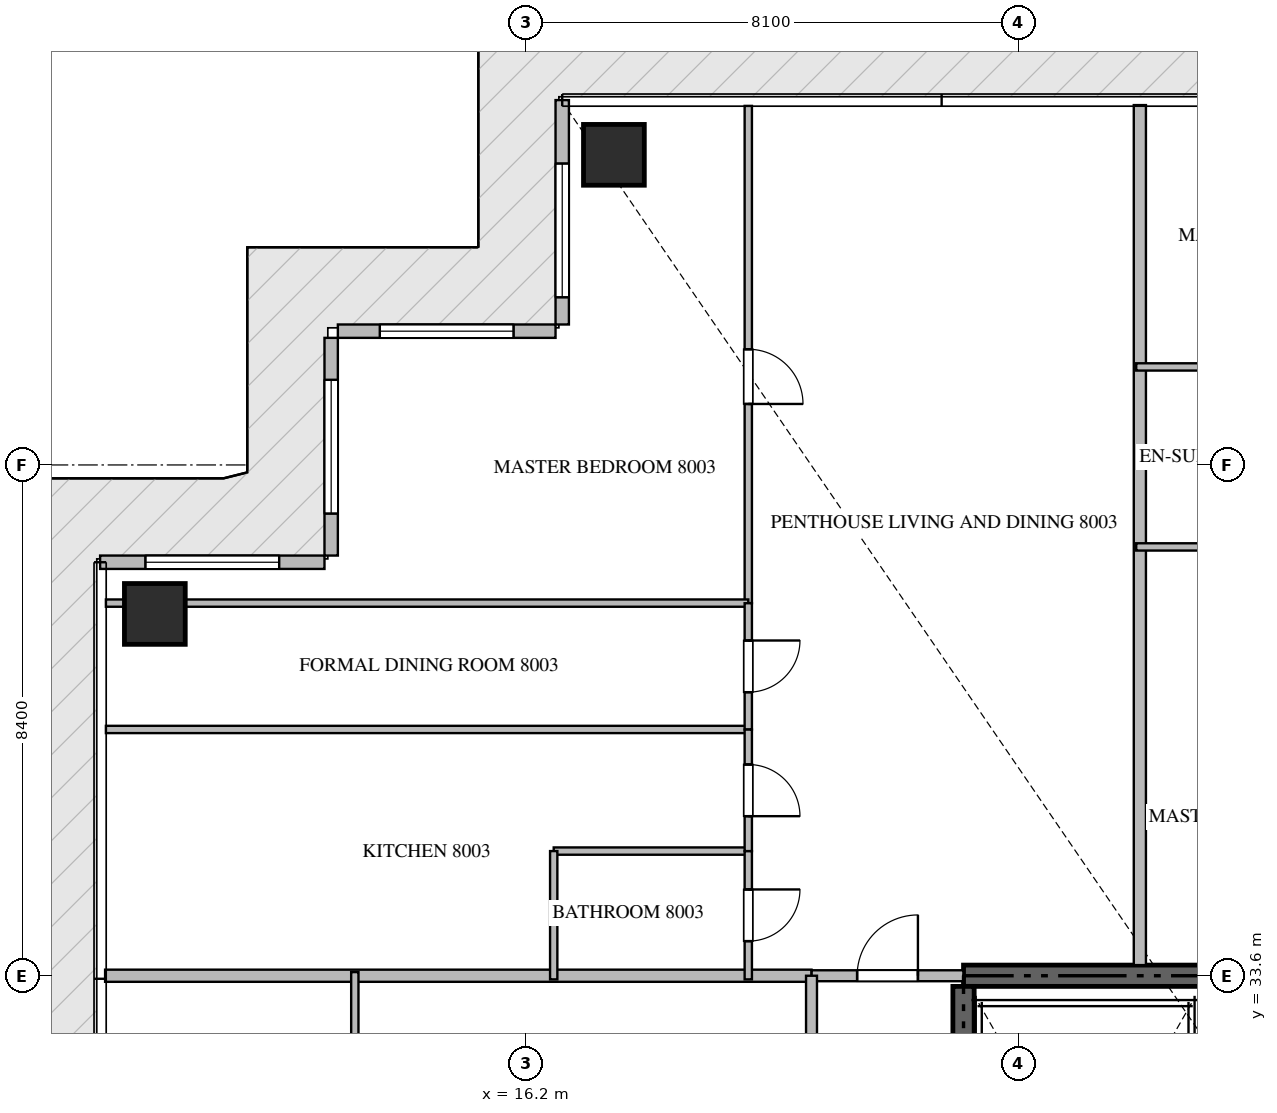
"""IFC4 building model, lengths in metres.
Left out: names, types, materials, properties, quantities, classifications, styles, units other than length and angle.
Written with IfcOpenShell. Run it as: python <this file> out.ifc"""

import sys

from ifc_helpers import new_model, si_unit, direction, frame, frame_2d, origin, origin_2d, place, context, subcontext, project, spatial, rectangle, extrude, source, transform, mapped, element, fill, save


model = new_model("IFC4")
c1 = context("Model", 3, precision=1e-05, world=origin(), true_north=direction((0.0, 1.0)))
c2 = subcontext(c1, "Body", "Model", "MODEL_VIEW")
j1 = project(units=[si_unit("LENGTHUNIT", "METRE"), si_unit("PLANEANGLEUNIT", "RADIAN")], contexts=[c1])
p1 = place(None, origin())
s1 = spatial("IfcSite", under=j1, at=p1, CompositionType="ELEMENT")
p2 = place(p1, origin())
s2 = spatial("IfcBuilding", under=s1, at=p2, CompositionType="ELEMENT")
p3 = place(p2, frame((0.0, 0.0, 321.8)))
s3 = spatial("IfcBuildingStorey", under=s2, at=p3, CompositionType="ELEMENT", Elevation=321.8)
p4 = place(p3, frame((41.4, 33.6, -0.26), z_axis=(0.0, 0.0, 1.0), x_axis=(-1.0, 0.0, 0.0)))
e1 = element("IfcWall", 1, at=p4, inside=s3, PredefinedType="SHEAR", context=c2, shape_type="SweptSolid", body=[
    extrude(rectangle(XDim=18.0, YDim=0.35, at=frame_2d((9.0, 0.0))), origin(), (0.0, 0.0, 1.0), 4.048),
])
p5 = place(p3, frame((23.4, 24.25, -0.26), z_axis=(0.0, 0.0, 1.0), x_axis=(0.0, 1.0, 0.0)))
e2 = element("IfcWall", 2, at=p5, inside=s3, PredefinedType="SHEAR", context=c2, shape_type="SweptSolid", body=[
    extrude(rectangle(XDim=9.175, YDim=0.35, at=frame_2d((4.587, 0.0))), origin(), (0.0, 0.0, 1.0), 4.048),
])
m1 = source(origin(), c2, "Body", "SweptSolid", [
    extrude(rectangle(XDim=1.0, YDim=1.0, at=origin_2d()), origin(), (0.0, 0.0, 1.0), 4.05),
])
for number, where, z_axis, x_axis in (
    (3, (17.65, 47.1, -0.26), (0.0, 0.0, 1.0), (1.0, 0.0, 0.0)),
    (4, (10.1, 39.55, -0.26), (0.0, 0.0, 1.0), (1.0, 0.0, 0.0)),
):
    element("IfcColumn", number, at=place(p3, frame(where, z_axis=z_axis, x_axis=x_axis)), inside=s3, PredefinedType="COLUMN", context=c2, shape_type="MappedRepresentation", body=[
        mapped(m1, transform((0.0, 0.0, 0.0), scale=1.0)),
    ])
p6 = place(p3, frame((16.8, 48.0, 0.0), z_axis=(0.0, 0.0, 1.0), x_axis=(0.0, -1.0, 0.0)))
e5 = element("IfcWall", 5, at=p6, inside=s3, PredefinedType="ELEMENTEDWALL", context=c2, shape_type="SweptSolid", body=[
    extrude(rectangle(XDim=3.69, YDim=0.22, at=frame_2d((1.845, 0.0))), origin(), (0.0, 0.0, 1.0), 3.775),
])
p7 = place(p6, frame((1.043, 0.0, 0.65)))
e6 = element("IfcOpeningElement", 6, at=p7, cuts=e5, PredefinedType="OPENING", context=c2, shape_type="SweptSolid", body=[
    extrude(rectangle(XDim=2.2, YDim=2.4, at=frame_2d((1.1, 1.2))), frame((0.0, 0.12, 0.0), z_axis=(0.0, -1.0, 0.0), x_axis=(1.0, 0.0, 0.0)), (0.0, 0.0, 1.0), 0.24),
])
p8 = place(p3, frame((16.69, 44.2, 0.0), z_axis=(0.0, 0.0, 1.0), x_axis=(-1.0, 0.0, 0.0)))
e7 = element("IfcWall", 7, at=p8, inside=s3, PredefinedType="ELEMENTEDWALL", context=c2, shape_type="SweptSolid", body=[
    extrude(rectangle(XDim=3.58, YDim=0.22, at=frame_2d((1.79, 0.0))), origin(), (0.0, 0.0, 1.0), 3.775),
])
p9 = place(p8, frame((0.69, 0.0, 0.65)))
e8 = element("IfcOpeningElement", 8, at=p9, cuts=e7, PredefinedType="OPENING", context=c2, shape_type="SweptSolid", body=[
    extrude(rectangle(XDim=2.2, YDim=2.4, at=frame_2d((1.1, 1.2))), frame((0.0, 0.12, 0.0), z_axis=(0.0, -1.0, 0.0), x_axis=(1.0, 0.0, 0.0)), (0.0, 0.0, 1.0), 0.24),
])
p10 = place(p3, frame((13.0, 44.09, 0.0), z_axis=(0.0, 0.0, 1.0), x_axis=(0.0, -1.0, 0.0)))
e9 = element("IfcWall", 9, at=p10, inside=s3, PredefinedType="ELEMENTEDWALL", context=c2, shape_type="SweptSolid", body=[
    extrude(rectangle(XDim=3.58, YDim=0.22, at=frame_2d((1.79, 0.0))), origin(), (0.0, 0.0, 1.0), 3.775),
])
p11 = place(p10, frame((0.69, 0.0, 0.65)))
e10 = element("IfcOpeningElement", 10, at=p11, cuts=e9, PredefinedType="OPENING", context=c2, shape_type="SweptSolid", body=[
    extrude(rectangle(XDim=2.2, YDim=2.4, at=frame_2d((1.1, 1.2))), frame((0.0, 0.12, 0.0), z_axis=(0.0, -1.0, 0.0), x_axis=(1.0, 0.0, 0.0)), (0.0, 0.0, 1.0), 0.24),
])
p12 = place(p3, frame((12.89, 40.4, 0.0), z_axis=(0.0, 0.0, 1.0), x_axis=(-1.0, 0.0, 0.0)))
e11 = element("IfcWall", 11, at=p12, inside=s3, PredefinedType="ELEMENTEDWALL", context=c2, shape_type="SweptSolid", body=[
    extrude(rectangle(XDim=3.69, YDim=0.22, at=frame_2d((1.845, 0.0))), origin(), (0.0, 0.0, 1.0), 3.775),
])
p13 = place(p12, frame((0.745, 0.0, 0.65)))
e12 = element("IfcOpeningElement", 12, at=p13, cuts=e11, PredefinedType="OPENING", context=c2, shape_type="SweptSolid", body=[
    extrude(rectangle(XDim=2.2, YDim=2.4, at=frame_2d((1.1, 1.2))), frame((0.0, 0.12, 0.0), z_axis=(0.0, -1.0, 0.0), x_axis=(1.0, 0.0, 0.0)), (0.0, 0.0, 1.0), 0.24),
])
p14 = place(p3, frame((26.3, 33.775, 0.0), z_axis=(0.0, 0.0, 1.0), x_axis=(0.0, 1.0, 0.0)))
e13 = element("IfcWall", 13, at=p14, inside=s3, PredefinedType="PARTITIONING", context=c2, shape_type="SweptSolid", body=[
    extrude(rectangle(XDim=14.143, YDim=0.2, at=frame_2d((7.072, 0.0))), origin(), (0.0, 0.0, 1.0), 3.79),
])
p15 = place(p3, frame((9.282, 33.6, 0.0), z_axis=(0.0, 0.0, 1.0), x_axis=(1.0, 0.0, 0.0)))
e14 = element("IfcWall", 14, at=p15, inside=s3, PredefinedType="PARTITIONING", context=c2, shape_type="SweptSolid", body=[
    extrude(rectangle(XDim=11.618, YDim=0.2, at=frame_2d((5.809, 0.0))), origin(), (0.0, 0.0, 1.0), 3.79),
])
p16 = place(p3, frame((20.902, 33.6, 0.0), z_axis=(0.0, 0.0, 1.0), x_axis=(1.0, 0.0, 0.0)))
e15 = element("IfcWall", 15, at=p16, inside=s3, PredefinedType="PARTITIONING", context=c2, shape_type="SweptSolid", body=[
    extrude(rectangle(XDim=2.496, YDim=0.18, at=frame_2d((1.248, 0.0))), origin(), (0.0, 0.0, 1.0), 3.79),
])
p17 = place(p16, frame((0.748, 0.0, 0.0)))
e16 = element("IfcOpeningElement", 16, at=p17, cuts=e15, PredefinedType="OPENING", context=c2, shape_type="SweptSolid", body=[
    extrude(rectangle(XDim=1.0, YDim=2.15, at=frame_2d((0.5, 1.075))), frame((0.0, 0.1, 0.0), z_axis=(0.0, -1.0, 0.0), x_axis=(1.0, 0.0, 0.0)), (0.0, 0.0, 1.0), 0.2),
])
p18 = place(p3, frame((20.9, 16.8, 0.0), z_axis=(0.0, 0.0, 1.0), x_axis=(0.0, 1.0, 0.0)))
e17 = element("IfcWall", 17, at=p18, inside=s3, PredefinedType="PARTITIONING", context=c2, shape_type="SweptSolid", body=[
    extrude(rectangle(XDim=16.8, YDim=0.18, at=frame_2d((8.4, 0.0))), origin(), (0.0, 0.0, 1.0), 3.79),
])
p19 = place(p18, frame((1.3, 0.0, 0.0)))
e18 = element("IfcOpeningElement", 18, at=p19, cuts=e17, PredefinedType="OPENING", context=c2, shape_type="SweptSolid", body=[
    extrude(rectangle(XDim=1.0, YDim=2.15, at=frame_2d((0.5, 1.075))), frame((0.0, 0.1, 0.0), z_axis=(0.0, -1.0, 0.0), x_axis=(1.0, 0.0, 0.0)), (0.0, 0.0, 1.0), 0.2),
])
p20 = place(p3, frame((19.86, 47.905, 0.0), z_axis=(0.0, 0.0, 1.0), x_axis=(0.0, -1.0, 0.0)))
e19 = element("IfcWall", 19, at=p20, inside=s3, PredefinedType="PARTITIONING", context=c2, shape_type="SweptSolid", body=[
    extrude(rectangle(XDim=8.177, YDim=0.12, at=frame_2d((4.088, 0.0))), origin(), (0.0, 0.0, 1.0), 3.79),
])
p21 = place(p20, frame((4.002, 0.0, 0.0)))
e20 = element("IfcOpeningElement", 20, at=p21, cuts=e19, PredefinedType="OPENING", context=c2, shape_type="SweptSolid", body=[
    extrude(rectangle(XDim=0.9, YDim=2.1, at=frame_2d((0.45, 1.05))), frame((0.0, 0.07, 0.0), z_axis=(0.0, -1.0, 0.0), x_axis=(1.0, 0.0, 0.0)), (0.0, 0.0, 1.0), 0.14),
])
p22 = place(p3, frame((9.295, 39.728, 0.0), z_axis=(0.0, 0.0, 1.0), x_axis=(1.0, 0.0, 0.0)))
e21 = element("IfcWall", 21, at=p22, inside=s3, PredefinedType="PARTITIONING", context=c2, shape_type="SweptSolid", body=[
    extrude(rectangle(XDim=10.565, YDim=0.12, at=frame_2d((5.283, 0.0))), origin(), (0.0, 0.0, 1.0), 3.292),
])
p23 = place(p3, frame((9.295, 37.65, 0.0), z_axis=(0.0, 0.0, 1.0), x_axis=(1.0, 0.0, 0.0)))
e22 = element("IfcWall", 22, at=p23, inside=s3, PredefinedType="PARTITIONING", context=c2, shape_type="SweptSolid", body=[
    extrude(rectangle(XDim=10.565, YDim=0.12, at=frame_2d((5.283, 0.0))), origin(), (0.0, 0.0, 1.0), 3.79),
])
p24 = place(p3, frame((16.66, 35.65, 0.0), z_axis=(0.0, 0.0, 1.0), x_axis=(1.0, 0.0, 0.0)))
e23 = element("IfcWall", 23, at=p24, inside=s3, PredefinedType="PARTITIONING", context=c2, shape_type="SweptSolid", body=[
    extrude(rectangle(XDim=3.2, YDim=0.12, at=frame_2d((1.6, 0.0))), origin(), (0.0, 0.0, 1.0), 3.79),
])
p25 = place(p3, frame((16.66, 35.65, 0.0), z_axis=(0.0, 0.0, 1.0), x_axis=(0.0, -1.0, 0.0)))
e24 = element("IfcWall", 24, at=p25, inside=s3, PredefinedType="PARTITIONING", context=c2, shape_type="SweptSolid", body=[
    extrude(rectangle(XDim=2.11, YDim=0.12, at=frame_2d((1.055, 0.0))), origin(), (0.0, 0.0, 1.0), 3.79),
])
p26 = place(p3, frame((19.86, 39.726, 0.0), z_axis=(0.0, 0.0, 1.0), x_axis=(0.0, -1.0, 0.0)))
e25 = element("IfcWall", 25, at=p26, inside=s3, PredefinedType="PARTITIONING", context=c2, shape_type="SweptSolid", body=[
    extrude(rectangle(XDim=2.076, YDim=0.12, at=frame_2d((1.038, 0.0))), origin(), (0.0, 0.0, 1.0), 3.79),
])
p27 = place(p26, frame((0.613, 0.0, 0.0)))
e26 = element("IfcOpeningElement", 26, at=p27, cuts=e25, PredefinedType="OPENING", context=c2, shape_type="SweptSolid", body=[
    extrude(rectangle(XDim=0.85, YDim=2.1, at=frame_2d((0.425, 1.05))), frame((0.0, 0.07, 0.0), z_axis=(0.0, -1.0, 0.0), x_axis=(1.0, 0.0, 0.0)), (0.0, 0.0, 1.0), 0.14),
])
p28 = place(p3, frame((19.86, 37.648, 0.0), z_axis=(0.0, 0.0, 1.0), x_axis=(0.0, -1.0, 0.0)))
e27 = element("IfcWall", 27, at=p28, inside=s3, PredefinedType="PARTITIONING", context=c2, shape_type="SweptSolid", body=[
    extrude(rectangle(XDim=1.998, YDim=0.12, at=frame_2d((0.999, 0.0))), origin(), (0.0, 0.0, 1.0), 3.79),
])
p29 = place(p28, frame((0.574, 0.0, 0.0)))
e28 = element("IfcOpeningElement", 28, at=p29, cuts=e27, PredefinedType="OPENING", context=c2, shape_type="SweptSolid", body=[
    extrude(rectangle(XDim=0.85, YDim=2.1, at=frame_2d((0.425, 1.05))), frame((0.0, 0.07, 0.0), z_axis=(0.0, -1.0, 0.0), x_axis=(1.0, 0.0, 0.0)), (0.0, 0.0, 1.0), 0.14),
])
p30 = place(p3, frame((19.86, 35.648, 0.0), z_axis=(0.0, 0.0, 1.0), x_axis=(0.0, -1.0, 0.0)))
e29 = element("IfcWall", 29, at=p30, inside=s3, PredefinedType="PARTITIONING", context=c2, shape_type="SweptSolid", body=[
    extrude(rectangle(XDim=2.108, YDim=0.12, at=frame_2d((1.054, 0.0))), origin(), (0.0, 0.0, 1.0), 3.79),
])
p31 = place(p30, frame((0.629, 0.0, 0.0)))
e30 = element("IfcOpeningElement", 30, at=p31, cuts=e29, PredefinedType="OPENING", context=c2, shape_type="SweptSolid", body=[
    extrude(rectangle(XDim=0.85, YDim=2.1, at=frame_2d((0.425, 1.05))), frame((0.0, 0.07, 0.0), z_axis=(0.0, -1.0, 0.0), x_axis=(1.0, 0.0, 0.0)), (0.0, 0.0, 1.0), 0.14),
])
for number, where, z_axis, x_axis in (
    (31, (26.24, 43.612, 0.0), (0.0, 0.0, 1.0), (1.0, 0.0, 0.0)),
    (32, (26.24, 40.652, 0.0), (0.0, 0.0, 1.0), (1.0, 0.0, 0.0)),
):
    element("IfcWall", number, at=place(p3, frame(where, z_axis=z_axis, x_axis=x_axis)), inside=s3, PredefinedType="PARTITIONING", context=c2, shape_type="SweptSolid", body=[
        extrude(rectangle(XDim=4.79, YDim=0.12, at=frame_2d((2.395, 0.0))), origin(), (0.0, 0.0, 1.0), 3.79),
    ])
p32 = place(p3, frame((13.389, 23.18, 0.0), z_axis=(0.0, 0.0, 1.0), x_axis=(0.0, 1.0, 0.0)))
e33 = element("IfcWall", 33, at=p32, inside=s3, PredefinedType="PARTITIONING", context=c2, shape_type="SweptSolid", body=[
    extrude(rectangle(XDim=10.48, YDim=0.12, at=frame_2d((5.24, 0.0))), origin(), (0.0, 0.0, 1.0), 3.79),
])
m2 = source(origin(), c2, "Body", "SweptSolid", [
    extrude(rectangle(XDim=2.2, YDim=2.4, at=frame_2d((1.1, 1.2))), frame((0.0, 0.03, 0.0), z_axis=(0.0, -1.0, 0.0), x_axis=(1.0, 0.0, 0.0)), (0.0, 0.0, 1.0), 0.06),
])
p33 = place(p7, origin())
e34 = element("IfcWindow", 34, at=p33, inside=s3, PartitioningType="SINGLE_PANEL", PredefinedType="WINDOW", context=c2, shape_type="MappedRepresentation", body=[
    mapped(m2, transform((0.0, 0.0, 0.0), scale=1.0)),
])
fill(e6, e34)
p34 = place(p9, origin())
e35 = element("IfcWindow", 35, at=p34, inside=s3, PartitioningType="SINGLE_PANEL", PredefinedType="WINDOW", context=c2, shape_type="MappedRepresentation", body=[
    mapped(m2, transform((0.0, 0.0, 0.0), scale=1.0)),
])
fill(e8, e35)
p35 = place(p11, origin())
e36 = element("IfcWindow", 36, at=p35, inside=s3, PartitioningType="SINGLE_PANEL", PredefinedType="WINDOW", context=c2, shape_type="MappedRepresentation", body=[
    mapped(m2, transform((0.0, 0.0, 0.0), scale=1.0)),
])
fill(e10, e36)
p36 = place(p13, origin())
e37 = element("IfcWindow", 37, at=p36, inside=s3, PartitioningType="SINGLE_PANEL", PredefinedType="WINDOW", context=c2, shape_type="MappedRepresentation", body=[
    mapped(m2, transform((0.0, 0.0, 0.0), scale=1.0)),
])
fill(e12, e37)
m3 = source(origin(), c2, "Body", "SweptSolid", [
    extrude(rectangle(XDim=1.0, YDim=2.15, at=frame_2d((0.5, 1.075))), frame((0.0, 0.025, 0.0), z_axis=(0.0, -1.0, 0.0), x_axis=(1.0, 0.0, 0.0)), (0.0, 0.0, 1.0), 0.05),
])
p37 = place(p17, origin())
e38 = element("IfcDoor", 38, at=p37, inside=s3, OperationType="SINGLE_SWING_RIGHT", PredefinedType="DOOR", context=c2, shape_type="MappedRepresentation", body=[
    mapped(m3, transform((0.0, 0.0, 0.0), scale=1.0)),
])
fill(e16, e38)
m4 = source(origin(), c2, "Body", "SweptSolid", [
    extrude(rectangle(XDim=0.9, YDim=2.1, at=frame_2d((0.45, 1.05))), frame((0.0, 0.025, 0.0), z_axis=(0.0, -1.0, 0.0), x_axis=(1.0, 0.0, 0.0)), (0.0, 0.0, 1.0), 0.05),
])
p38 = place(p21, origin())
e39 = element("IfcDoor", 39, at=p38, inside=s3, OperationType="SINGLE_SWING_RIGHT", PredefinedType="DOOR", context=c2, shape_type="MappedRepresentation", body=[
    mapped(m4, transform((0.0, 0.0, 0.0), scale=1.0)),
])
fill(e20, e39)
m5 = source(origin(), c2, "Body", "SweptSolid", [
    extrude(rectangle(XDim=0.85, YDim=2.1, at=frame_2d((0.425, 1.05))), frame((0.0, 0.025, 0.0), z_axis=(0.0, -1.0, 0.0), x_axis=(1.0, 0.0, 0.0)), (0.0, 0.0, 1.0), 0.05),
])
p39 = place(p27, origin())
e40 = element("IfcDoor", 40, at=p39, inside=s3, OperationType="SINGLE_SWING_LEFT", PredefinedType="DOOR", context=c2, shape_type="MappedRepresentation", body=[
    mapped(m5, transform((0.0, 0.0, 0.0), scale=1.0)),
])
fill(e26, e40)
p40 = place(p29, origin())
e41 = element("IfcDoor", 41, at=p40, inside=s3, OperationType="SINGLE_SWING_RIGHT", PredefinedType="DOOR", context=c2, shape_type="MappedRepresentation", body=[
    mapped(m5, transform((0.0, 0.0, 0.0), scale=1.0)),
])
fill(e28, e41)
p41 = place(p31, origin())
e42 = element("IfcDoor", 42, at=p41, inside=s3, OperationType="SINGLE_SWING_LEFT", PredefinedType="DOOR", context=c2, shape_type="MappedRepresentation", body=[
    mapped(m5, transform((0.0, 0.0, 0.0), scale=1.0)),
])
fill(e30, e42)
save(model, sys.argv[1])
